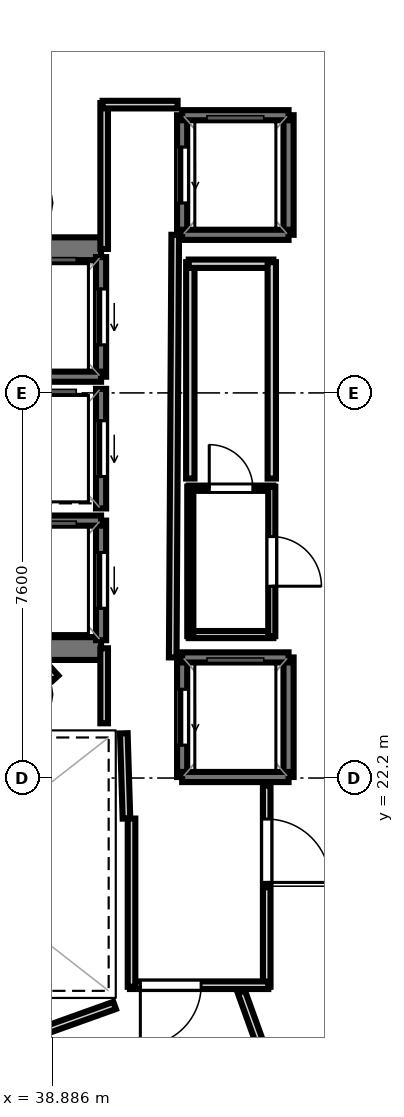
"""IFC4 building model, lengths in metres.
Left out: names, types, materials, properties, quantities, classifications, styles, units other than length and angle.
Written with IfcOpenShell. Run it as: python <this file> out.ifc"""

import sys

from ifc_helpers import new_model, si_unit, direction, frame, frame_2d, origin, place, context, subcontext, project, spatial, rectangle, extrude, element, fill, save


model = new_model("IFC4")
c1 = context("Model", 3, precision=1e-05, world=origin(), true_north=direction((0.0, 1.0)))
c2 = subcontext(c1, "Body", "Model", "MODEL_VIEW")
j1 = project(units=[si_unit("LENGTHUNIT", "METRE"), si_unit("PLANEANGLEUNIT", "RADIAN")], contexts=[c1])
p1 = place(None, origin())
s1 = spatial("IfcSite", under=j1, at=p1, CompositionType="ELEMENT")
p2 = place(p1, origin())
s2 = spatial("IfcBuilding", under=s1, at=p2, CompositionType="ELEMENT")
p3 = place(p2, frame((0.0, 0.0, 284.3)))
s3 = spatial("IfcBuildingStorey", under=s2, at=p3, CompositionType="ELEMENT", Elevation=284.3)
p4 = place(p3, frame((29.33, 32.645, 0.0), z_axis=(0.0, 0.0, 1.0), x_axis=(1.0, 0.0, 0.0)))
e1 = element("IfcWall", 1, at=p4, inside=s3, PredefinedType="SHEAR", context=c2, shape_type="SweptSolid", body=[
    extrude(rectangle(XDim=10.52, YDim=0.45, at=frame_2d((5.26, 0.0))), origin(), (0.0, 0.0, 1.0), 3.52),
])
p5 = place(p4, frame((0.895, 0.0, 0.0)))
e2 = element("IfcOpeningElement", 2, at=p5, cuts=e1, PredefinedType="OPENING", context=c2, shape_type="SweptSolid", body=[
    extrude(rectangle(XDim=1.25, YDim=2.15, at=frame_2d((0.625, 1.075))), frame((0.0, 0.235, 0.0), z_axis=(0.0, -1.0, 0.0), x_axis=(1.0, 0.0, 0.0)), (0.0, 0.0, 1.0), 0.47),
])
p6 = place(p3, frame((29.33, 24.755, 0.0), z_axis=(0.0, 0.0, 1.0), x_axis=(1.0, 0.0, 0.0)))
e3 = element("IfcWall", 3, at=p6, inside=s3, PredefinedType="SHEAR", context=c2, shape_type="SweptSolid", body=[
    extrude(rectangle(XDim=10.52, YDim=0.45, at=frame_2d((5.26, 0.0))), origin(), (0.0, 0.0, 1.0), 3.52),
])
p7 = place(p6, frame((0.695, 0.0, 0.0)))
e4 = element("IfcOpeningElement", 4, at=p7, cuts=e3, PredefinedType="OPENING", context=c2, shape_type="SweptSolid", body=[
    extrude(rectangle(XDim=1.25, YDim=2.15, at=frame_2d((0.625, 1.075))), frame((0.0, 0.235, 0.0), z_axis=(0.0, -1.0, 0.0), x_axis=(1.0, 0.0, 0.0)), (0.0, 0.0, 1.0), 0.47),
])
p8 = place(p3, frame((39.85, 30.12, 0.0), z_axis=(0.0, 0.0, 1.0), x_axis=(0.0, 1.0, 0.0)))
e5 = element("IfcWall", 5, at=p8, inside=s3, PredefinedType="SOLIDWALL", context=c2, shape_type="SweptSolid", body=[
    extrude(rectangle(XDim=2.36, YDim=0.2, at=frame_2d((1.18, 0.0))), origin(), (0.0, 0.0, 1.0), 3.52),
])
p9 = place(p8, frame((0.63, 0.0, 0.0)))
e6 = element("IfcOpeningElement", 6, at=p9, cuts=e5, PredefinedType="OPENING", context=c2, shape_type="SweptSolid", body=[
    extrude(rectangle(XDim=1.1, YDim=2.15, at=frame_2d((0.55, 1.075))), frame((0.0, 0.11, 0.0), z_axis=(0.0, -1.0, 0.0), x_axis=(1.0, 0.0, 0.0)), (0.0, 0.0, 1.0), 0.22),
])
p10 = place(p3, frame((37.75, 30.12, 0.0), z_axis=(0.0, 0.0, 1.0), x_axis=(1.0, 0.0, 0.0)))
e7 = element("IfcWall", 7, at=p10, inside=s3, PredefinedType="SOLIDWALL", context=c2, shape_type="SweptSolid", body=[
    extrude(rectangle(XDim=2.1, YDim=0.2, at=frame_2d((1.05, 0.0))), origin(), (0.0, 0.0, 1.0), 3.52),
])
p11 = place(p3, frame((39.85, 24.92, 0.0), z_axis=(0.0, 0.0, 1.0), x_axis=(0.0, 1.0, 0.0)))
e8 = element("IfcWall", 8, at=p11, inside=s3, PredefinedType="SOLIDWALL", context=c2, shape_type="SweptSolid", body=[
    extrude(rectangle(XDim=2.36, YDim=0.2, at=frame_2d((1.18, 0.0))), origin(), (0.0, 0.0, 1.0), 3.52),
])
p12 = place(p11, frame((0.63, 0.0, 0.0)))
e9 = element("IfcOpeningElement", 9, at=p12, cuts=e8, PredefinedType="OPENING", context=c2, shape_type="SweptSolid", body=[
    extrude(rectangle(XDim=1.1, YDim=2.15, at=frame_2d((0.55, 1.075))), frame((0.0, 0.11, 0.0), z_axis=(0.0, -1.0, 0.0), x_axis=(1.0, 0.0, 0.0)), (0.0, 0.0, 1.0), 0.22),
])
p13 = place(p3, frame((37.75, 27.28, 0.0), z_axis=(0.0, 0.0, 1.0), x_axis=(1.0, 0.0, 0.0)))
e10 = element("IfcWall", 10, at=p13, inside=s3, PredefinedType="SOLIDWALL", context=c2, shape_type="SweptSolid", body=[
    extrude(rectangle(XDim=2.1, YDim=0.2, at=frame_2d((1.05, 0.0))), origin(), (0.0, 0.0, 1.0), 3.52),
])
p14 = place(p3, frame((39.85, 27.52, 0.0), z_axis=(0.0, 0.0, 1.0), x_axis=(0.0, 1.0, 0.0)))
e11 = element("IfcWall", 11, at=p14, inside=s3, PredefinedType="SOLIDWALL", context=c2, shape_type="SweptSolid", body=[
    extrude(rectangle(XDim=2.36, YDim=0.2, at=frame_2d((1.18, 0.0))), origin(), (0.0, 0.0, 1.0), 3.52),
])
p15 = place(p14, frame((0.63, 0.0, 0.0)))
e12 = element("IfcOpeningElement", 12, at=p15, cuts=e11, PredefinedType="OPENING", context=c2, shape_type="SweptSolid", body=[
    extrude(rectangle(XDim=1.1, YDim=2.15, at=frame_2d((0.55, 1.075))), frame((0.0, 0.11, 0.0), z_axis=(0.0, -1.0, 0.0), x_axis=(1.0, 0.0, 0.0)), (0.0, 0.0, 1.0), 0.22),
])
p16 = place(p3, frame((43.55, 22.22, 0.0), z_axis=(0.0, 0.0, 1.0), x_axis=(0.0, 1.0, 0.0)))
e13 = element("IfcWall", 13, at=p16, inside=s3, PredefinedType="SOLIDWALL", context=c2, shape_type="SweptSolid", body=[
    extrude(rectangle(XDim=2.36, YDim=0.2, at=frame_2d((1.18, 0.0))), origin(), (0.0, 0.0, 1.0), 3.52),
])
p17 = place(p3, frame((41.45, 22.22, 0.0), z_axis=(0.0, 0.0, 1.0), x_axis=(0.0, 1.0, 0.0)))
e14 = element("IfcWall", 14, at=p17, inside=s3, PredefinedType="SOLIDWALL", context=c2, shape_type="SweptSolid", body=[
    extrude(rectangle(XDim=2.36, YDim=0.2, at=frame_2d((1.18, 0.0))), origin(), (0.0, 0.0, 1.0), 3.52),
])
p18 = place(p17, frame((0.63, 0.0, 0.0)))
e15 = element("IfcOpeningElement", 15, at=p18, cuts=e14, PredefinedType="OPENING", context=c2, shape_type="SweptSolid", body=[
    extrude(rectangle(XDim=1.1, YDim=2.15, at=frame_2d((0.55, 1.075))), frame((0.0, 0.11, 0.0), z_axis=(0.0, -1.0, 0.0), x_axis=(1.0, 0.0, 0.0)), (0.0, 0.0, 1.0), 0.22),
])
for number, where, z_axis, x_axis in (
    (16, (41.45, 24.58, 0.0), (0.0, 0.0, 1.0), (1.0, 0.0, 0.0)),
    (17, (41.45, 22.22, 0.0), (0.0, 0.0, 1.0), (1.0, 0.0, 0.0)),
):
    element("IfcWall", number, at=place(p3, frame(where, z_axis=z_axis, x_axis=x_axis)), inside=s3, PredefinedType="SOLIDWALL", context=c2, shape_type="SweptSolid", body=[
        extrude(rectangle(XDim=2.1, YDim=0.2, at=frame_2d((1.05, 0.0))), origin(), (0.0, 0.0, 1.0), 3.52),
    ])
p19 = place(p3, frame((43.55, 32.92, 0.0), z_axis=(0.0, 0.0, 1.0), x_axis=(0.0, 1.0, 0.0)))
e18 = element("IfcWall", 18, at=p19, inside=s3, PredefinedType="SOLIDWALL", context=c2, shape_type="SweptSolid", body=[
    extrude(rectangle(XDim=2.36, YDim=0.2, at=frame_2d((1.18, 0.0))), origin(), (0.0, 0.0, 1.0), 3.52),
])
p20 = place(p3, frame((41.45, 32.92, 0.0), z_axis=(0.0, 0.0, 1.0), x_axis=(0.0, 1.0, 0.0)))
e19 = element("IfcWall", 19, at=p20, inside=s3, PredefinedType="SOLIDWALL", context=c2, shape_type="SweptSolid", body=[
    extrude(rectangle(XDim=2.36, YDim=0.2, at=frame_2d((1.18, 0.0))), origin(), (0.0, 0.0, 1.0), 3.52),
])
p21 = place(p20, frame((0.63, 0.0, 0.0)))
e20 = element("IfcOpeningElement", 20, at=p21, cuts=e19, PredefinedType="OPENING", context=c2, shape_type="SweptSolid", body=[
    extrude(rectangle(XDim=1.1, YDim=2.15, at=frame_2d((0.55, 1.075))), frame((0.0, 0.11, 0.0), z_axis=(0.0, -1.0, 0.0), x_axis=(1.0, 0.0, 0.0)), (0.0, 0.0, 1.0), 0.22),
])
for number, where, z_axis, x_axis in (
    (21, (41.45, 35.28, 0.0), (0.0, 0.0, 1.0), (1.0, 0.0, 0.0)),
    (22, (41.45, 32.92, 0.0), (0.0, 0.0, 1.0), (1.0, 0.0, 0.0)),
):
    element("IfcWall", number, at=place(p3, frame(where, z_axis=z_axis, x_axis=x_axis)), inside=s3, PredefinedType="SOLIDWALL", context=c2, shape_type="SweptSolid", body=[
        extrude(rectangle(XDim=2.1, YDim=0.2, at=frame_2d((1.05, 0.0))), origin(), (0.0, 0.0, 1.0), 3.52),
    ])
p22 = place(p3, frame((40.351, 21.401, 0.0), z_axis=(0.0, 0.0, 1.0), x_axis=(-0.031058045979, 0.999517582527, 0.0)))
e23 = element("IfcWall", 23, at=p22, inside=s3, PredefinedType="PARTITIONING", context=c2, shape_type="SweptSolid", body=[
    extrude(rectangle(XDim=1.682, YDim=0.15, at=frame_2d((0.841, 0.0))), origin(), (0.0, 0.0, 1.0), 2.84),
])
p23 = place(p3, frame((39.911, 23.28, 0.0), z_axis=(0.0, 0.0, 1.0), x_axis=(0.0, 1.0, 0.0)))
e24 = element("IfcWall", 24, at=p23, inside=s3, PredefinedType="PARTITIONING", context=c2, shape_type="SweptSolid", body=[
    extrude(rectangle(XDim=1.48, YDim=0.15, at=frame_2d((0.74, 0.0))), origin(), (0.0, 0.0, 1.0), 2.84),
])
p24 = place(p3, frame((39.911, 32.64, 0.0), z_axis=(0.0, 0.0, 1.0), x_axis=(0.0, 1.0, 0.0)))
e25 = element("IfcWall", 25, at=p24, inside=s3, PredefinedType="PARTITIONING", context=c2, shape_type="SweptSolid", body=[
    extrude(rectangle(XDim=2.88, YDim=0.15, at=frame_2d((1.44, 0.0))), origin(), (0.0, 0.0, 1.0), 2.84),
])
p25 = place(p3, frame((39.88, 35.489, 0.0), z_axis=(0.0, 0.0, 1.0), x_axis=(1.0, 0.0, 0.0)))
e26 = element("IfcWall", 26, at=p25, inside=s3, PredefinedType="PARTITIONING", context=c2, shape_type="SweptSolid", body=[
    extrude(rectangle(XDim=1.48, YDim=0.15, at=frame_2d((0.74, 0.0))), origin(), (0.0, 0.0, 1.0), 2.84),
])
p26 = place(p3, frame((41.313, 32.92, 0.0), z_axis=(0.0, 0.0, 1.0), x_axis=(-0.005942518022, -0.999982343084, 0.0)))
e27 = element("IfcWall", 27, at=p26, inside=s3, PredefinedType="PARTITIONING", context=c2, shape_type="SweptSolid", body=[
    extrude(rectangle(XDim=8.34, YDim=0.15, at=frame_2d((4.17, 0.0))), origin(), (0.0, 0.0, 1.0), 2.84),
])
p27 = place(p3, frame((43.119, 22.05, 0.0), z_axis=(0.0, 0.0, 1.0), x_axis=(0.0, -1.0, 0.0)))
e28 = element("IfcWall", 28, at=p27, inside=s3, PredefinedType="PARTITIONING", context=c2, shape_type="SweptSolid", body=[
    extrude(rectangle(XDim=3.97, YDim=0.15, at=frame_2d((1.985, 0.0))), origin(), (0.0, 0.0, 1.0), 2.84),
])
p28 = place(p27, frame((0.66, 0.0, 0.0)))
e29 = element("IfcOpeningElement", 29, at=p28, cuts=e28, PredefinedType="OPENING", context=c2, shape_type="SweptSolid", body=[
    extrude(rectangle(XDim=1.25, YDim=2.2, at=frame_2d((0.625, 1.1))), frame((0.0, 0.085, 0.0), z_axis=(0.0, -1.0, 0.0), x_axis=(1.0, 0.0, 0.0)), (0.0, 0.0, 1.0), 0.17),
])
p29 = place(p3, frame((43.15, 18.111, 0.0), z_axis=(0.0, 0.0, 1.0), x_axis=(-1.0, 0.0, 0.0)))
e30 = element("IfcWall", 30, at=p29, inside=s3, PredefinedType="PARTITIONING", context=c2, shape_type="SweptSolid", body=[
    extrude(rectangle(XDim=2.73, YDim=0.15, at=frame_2d((1.365, 0.0))), origin(), (0.0, 0.0, 1.0), 2.84),
])
p30 = place(p29, frame((1.325, 0.0, 0.0)))
e31 = element("IfcOpeningElement", 31, at=p30, cuts=e30, PredefinedType="OPENING", context=c2, shape_type="SweptSolid", body=[
    extrude(rectangle(XDim=1.2, YDim=2.15, at=frame_2d((0.6, 1.075))), frame((0.0, 0.085, 0.0), z_axis=(0.0, -1.0, 0.0), x_axis=(1.0, 0.0, 0.0)), (0.0, 0.0, 1.0), 0.17),
])
p31 = place(p3, frame((40.451, 18.08, 0.0), z_axis=(0.0, 0.0, 1.0), x_axis=(0.0, 1.0, 0.0)))
e32 = element("IfcWall", 32, at=p31, inside=s3, PredefinedType="PARTITIONING", context=c2, shape_type="SweptSolid", body=[
    extrude(rectangle(XDim=3.32, YDim=0.15, at=frame_2d((1.66, 0.0))), origin(), (0.0, 0.0, 1.0), 2.84),
])
p32 = place(p3, frame((43.25, 25.031, 0.0), z_axis=(0.0, 0.0, 1.0), x_axis=(-1.0, 0.0, 0.0)))
e33 = element("IfcWall", 33, at=p32, inside=s3, PredefinedType="PARTITIONING", context=c2, shape_type="SweptSolid", body=[
    extrude(rectangle(XDim=1.67, YDim=0.14, at=frame_2d((0.835, 0.0))), origin(), (0.0, 0.0, 1.0), 2.84),
])
p33 = place(p3, frame((41.611, 25.0, 0.0), z_axis=(0.0, 0.0, 1.0), x_axis=(0.0, 1.0, 0.0)))
e34 = element("IfcWall", 34, at=p33, inside=s3, PredefinedType="PARTITIONING", context=c2, shape_type="SweptSolid", body=[
    extrude(rectangle(XDim=2.95, YDim=0.12, at=frame_2d((1.475, 0.0))), origin(), (0.0, 0.0, 1.0), 2.84),
])
p34 = place(p3, frame((41.58, 27.919, 0.0), z_axis=(0.0, 0.0, 1.0), x_axis=(1.0, 0.0, 0.0)))
e35 = element("IfcWall", 35, at=p34, inside=s3, PredefinedType="PARTITIONING", context=c2, shape_type="SweptSolid", body=[
    extrude(rectangle(XDim=1.67, YDim=0.105, at=frame_2d((0.835, 0.0))), origin(), (0.0, 0.0, 1.0), 2.84),
])
p35 = place(p34, frame((0.405, 0.0, 0.0)))
e36 = element("IfcOpeningElement", 36, at=p35, cuts=e35, PredefinedType="OPENING", context=c2, shape_type="SweptSolid", body=[
    extrude(rectangle(XDim=0.86, YDim=2.05, at=frame_2d((0.43, 1.025))), frame((0.0, 0.062, 0.0), z_axis=(0.0, -1.0, 0.0), x_axis=(1.0, 0.0, 0.0)), (0.0, 0.0, 1.0), 0.125),
])
p36 = place(p3, frame((43.219, 27.95, 0.0), z_axis=(0.0, 0.0, 1.0), x_axis=(0.0, -1.0, 0.0)))
e37 = element("IfcWall", 37, at=p36, inside=s3, PredefinedType="PARTITIONING", context=c2, shape_type="SweptSolid", body=[
    extrude(rectangle(XDim=2.95, YDim=0.14, at=frame_2d((1.475, 0.0))), origin(), (0.0, 0.0, 1.0), 2.84),
])
p37 = place(p36, frame((0.985, 0.0, 0.0)))
e38 = element("IfcOpeningElement", 38, at=p37, cuts=e37, PredefinedType="OPENING", context=c2, shape_type="SweptSolid", body=[
    extrude(rectangle(XDim=0.98, YDim=2.1, at=frame_2d((0.49, 1.05))), frame((0.0, 0.08, 0.0), z_axis=(0.0, -1.0, 0.0), x_axis=(1.0, 0.0, 0.0)), (0.0, 0.0, 1.0), 0.16),
])
p38 = place(p3, frame((41.611, 28.11, 0.0), z_axis=(0.0, 0.0, 1.0), x_axis=(0.0, 1.0, 0.0)))
e39 = element("IfcWall", 39, at=p38, inside=s3, PredefinedType="PLUMBINGWALL", context=c2, shape_type="SweptSolid", body=[
    extrude(rectangle(XDim=4.27, YDim=0.165, at=frame_2d((2.135, 0.0))), origin(), (0.0, 0.0, 1.0), 2.84),
])
p39 = place(p3, frame((41.58, 32.349, 0.0), z_axis=(0.0, 0.0, 1.0), x_axis=(1.0, 0.0, 0.0)))
e40 = element("IfcWall", 40, at=p39, inside=s3, PredefinedType="PLUMBINGWALL", context=c2, shape_type="SweptSolid", body=[
    extrude(rectangle(XDim=1.67, YDim=0.165, at=frame_2d((0.835, 0.0))), origin(), (0.0, 0.0, 1.0), 2.84),
])
p40 = place(p3, frame((43.219, 32.38, 0.0), z_axis=(0.0, 0.0, 1.0), x_axis=(0.0, -1.0, 0.0)))
e41 = element("IfcWall", 41, at=p40, inside=s3, PredefinedType="PLUMBINGWALL", context=c2, shape_type="SweptSolid", body=[
    extrude(rectangle(XDim=4.27, YDim=0.165, at=frame_2d((2.135, 0.0))), origin(), (0.0, 0.0, 1.0), 2.84),
])
p41 = place(p3, frame((38.951, 24.171, 0.0), z_axis=(0.0, 0.0, 1.0), x_axis=(-0.674186852077, 0.738560822469, 0.0)))
e42 = element("IfcWall", 42, at=p41, inside=s3, PredefinedType="PARTITIONING", context=c2, shape_type="SweptSolid", body=[
    extrude(rectangle(XDim=0.281, YDim=0.15, at=frame_2d((0.14, 0.0))), origin(), (0.0, 0.0, 1.0), 2.84),
])
p42 = place(p3, frame((36.81, 16.529, 0.0), z_axis=(0.0, 0.0, 1.0), x_axis=(0.941548344365, 0.33687789364, 0.0)))
e43 = element("IfcWall", 43, at=p42, inside=s3, PredefinedType="PARTITIONING", context=c2, shape_type="SweptSolid", body=[
    extrude(rectangle(XDim=3.513, YDim=0.15, at=frame_2d((1.756, 0.0))), origin(), (0.0, 0.0, 1.0), 2.84),
])
p43 = place(p3, frame((42.619, 17.98, 0.0), z_axis=(0.0, 0.0, 1.0), x_axis=(0.339302003936, -0.940677495279, 0.0)))
e44 = element("IfcWall", 44, at=p43, inside=s3, PredefinedType="PARTITIONING", context=c2, shape_type="SweptSolid", body=[
    extrude(rectangle(XDim=2.716, YDim=0.15, at=frame_2d((1.358, 0.0))), origin(), (0.0, 0.0, 1.0), 2.84),
])
p44 = place(p9, origin())
e45 = element("IfcDoor", 45, at=p44, inside=s3, OperationType="SLIDING_TO_LEFT", PredefinedType="DOOR", context=c2, shape_type="SweptSolid", body=[
    extrude(rectangle(XDim=1.1, YDim=2.15, at=frame_2d((0.55, 1.075))), frame((0.0, 0.025, 0.0), z_axis=(0.0, -1.0, 0.0), x_axis=(1.0, 0.0, 0.0)), (0.0, 0.0, 1.0), 0.05),
])
fill(e6, e45)
p45 = place(p12, origin())
e46 = element("IfcDoor", 46, at=p45, inside=s3, OperationType="SLIDING_TO_LEFT", PredefinedType="DOOR", context=c2, shape_type="SweptSolid", body=[
    extrude(rectangle(XDim=1.1, YDim=2.15, at=frame_2d((0.55, 1.075))), frame((0.0, 0.025, 0.0), z_axis=(0.0, -1.0, 0.0), x_axis=(1.0, 0.0, 0.0)), (0.0, 0.0, 1.0), 0.05),
])
fill(e9, e46)
p46 = place(p15, origin())
e47 = element("IfcDoor", 47, at=p46, inside=s3, OperationType="SLIDING_TO_LEFT", PredefinedType="DOOR", context=c2, shape_type="SweptSolid", body=[
    extrude(rectangle(XDim=1.1, YDim=2.15, at=frame_2d((0.55, 1.075))), frame((0.0, 0.025, 0.0), z_axis=(0.0, -1.0, 0.0), x_axis=(1.0, 0.0, 0.0)), (0.0, 0.0, 1.0), 0.05),
])
fill(e12, e47)
p47 = place(p18, origin())
e48 = element("IfcDoor", 48, at=p47, inside=s3, OperationType="SLIDING_TO_LEFT", PredefinedType="DOOR", context=c2, shape_type="SweptSolid", body=[
    extrude(rectangle(XDim=1.1, YDim=2.15, at=frame_2d((0.55, 1.075))), frame((0.0, 0.025, 0.0), z_axis=(0.0, -1.0, 0.0), x_axis=(1.0, 0.0, 0.0)), (0.0, 0.0, 1.0), 0.05),
])
fill(e15, e48)
p48 = place(p21, origin())
e49 = element("IfcDoor", 49, at=p48, inside=s3, OperationType="SLIDING_TO_LEFT", PredefinedType="DOOR", context=c2, shape_type="SweptSolid", body=[
    extrude(rectangle(XDim=1.1, YDim=2.15, at=frame_2d((0.55, 1.075))), frame((0.0, 0.025, 0.0), z_axis=(0.0, -1.0, 0.0), x_axis=(1.0, 0.0, 0.0)), (0.0, 0.0, 1.0), 0.05),
])
fill(e20, e49)
p49 = place(p30, origin())
e50 = element("IfcDoor", 50, at=p49, inside=s3, OperationType="SINGLE_SWING_RIGHT", PredefinedType="DOOR", context=c2, shape_type="SweptSolid", body=[
    extrude(rectangle(XDim=1.2, YDim=2.15, at=frame_2d((0.6, 1.075))), frame((0.0, 0.025, 0.0), z_axis=(0.0, -1.0, 0.0), x_axis=(1.0, 0.0, 0.0)), (0.0, 0.0, 1.0), 0.05),
])
fill(e31, e50)
p50 = place(p28, origin())
e51 = element("IfcDoor", 51, at=p50, inside=s3, OperationType="SINGLE_SWING_RIGHT", PredefinedType="DOOR", context=c2, shape_type="SweptSolid", body=[
    extrude(rectangle(XDim=1.25, YDim=2.2, at=frame_2d((0.625, 1.1))), frame((0.0, 0.025, 0.0), z_axis=(0.0, -1.0, 0.0), x_axis=(1.0, 0.0, 0.0)), (0.0, 0.0, 1.0), 0.05),
])
fill(e29, e51)
p51 = place(p37, origin())
e52 = element("IfcDoor", 52, at=p51, inside=s3, OperationType="SINGLE_SWING_RIGHT", PredefinedType="DOOR", context=c2, shape_type="SweptSolid", body=[
    extrude(rectangle(XDim=0.98, YDim=2.1, at=frame_2d((0.49, 1.05))), frame((0.0, 0.025, 0.0), z_axis=(0.0, -1.0, 0.0), x_axis=(1.0, 0.0, 0.0)), (0.0, 0.0, 1.0), 0.05),
])
fill(e38, e52)
p52 = place(p35, origin())
e53 = element("IfcDoor", 53, at=p52, inside=s3, OperationType="SINGLE_SWING_LEFT", PredefinedType="DOOR", context=c2, shape_type="SweptSolid", body=[
    extrude(rectangle(XDim=0.86, YDim=2.05, at=frame_2d((0.43, 1.025))), frame((0.0, 0.025, 0.0), z_axis=(0.0, -1.0, 0.0), x_axis=(1.0, 0.0, 0.0)), (0.0, 0.0, 1.0), 0.05),
])
fill(e36, e53)
save(model, sys.argv[1])
